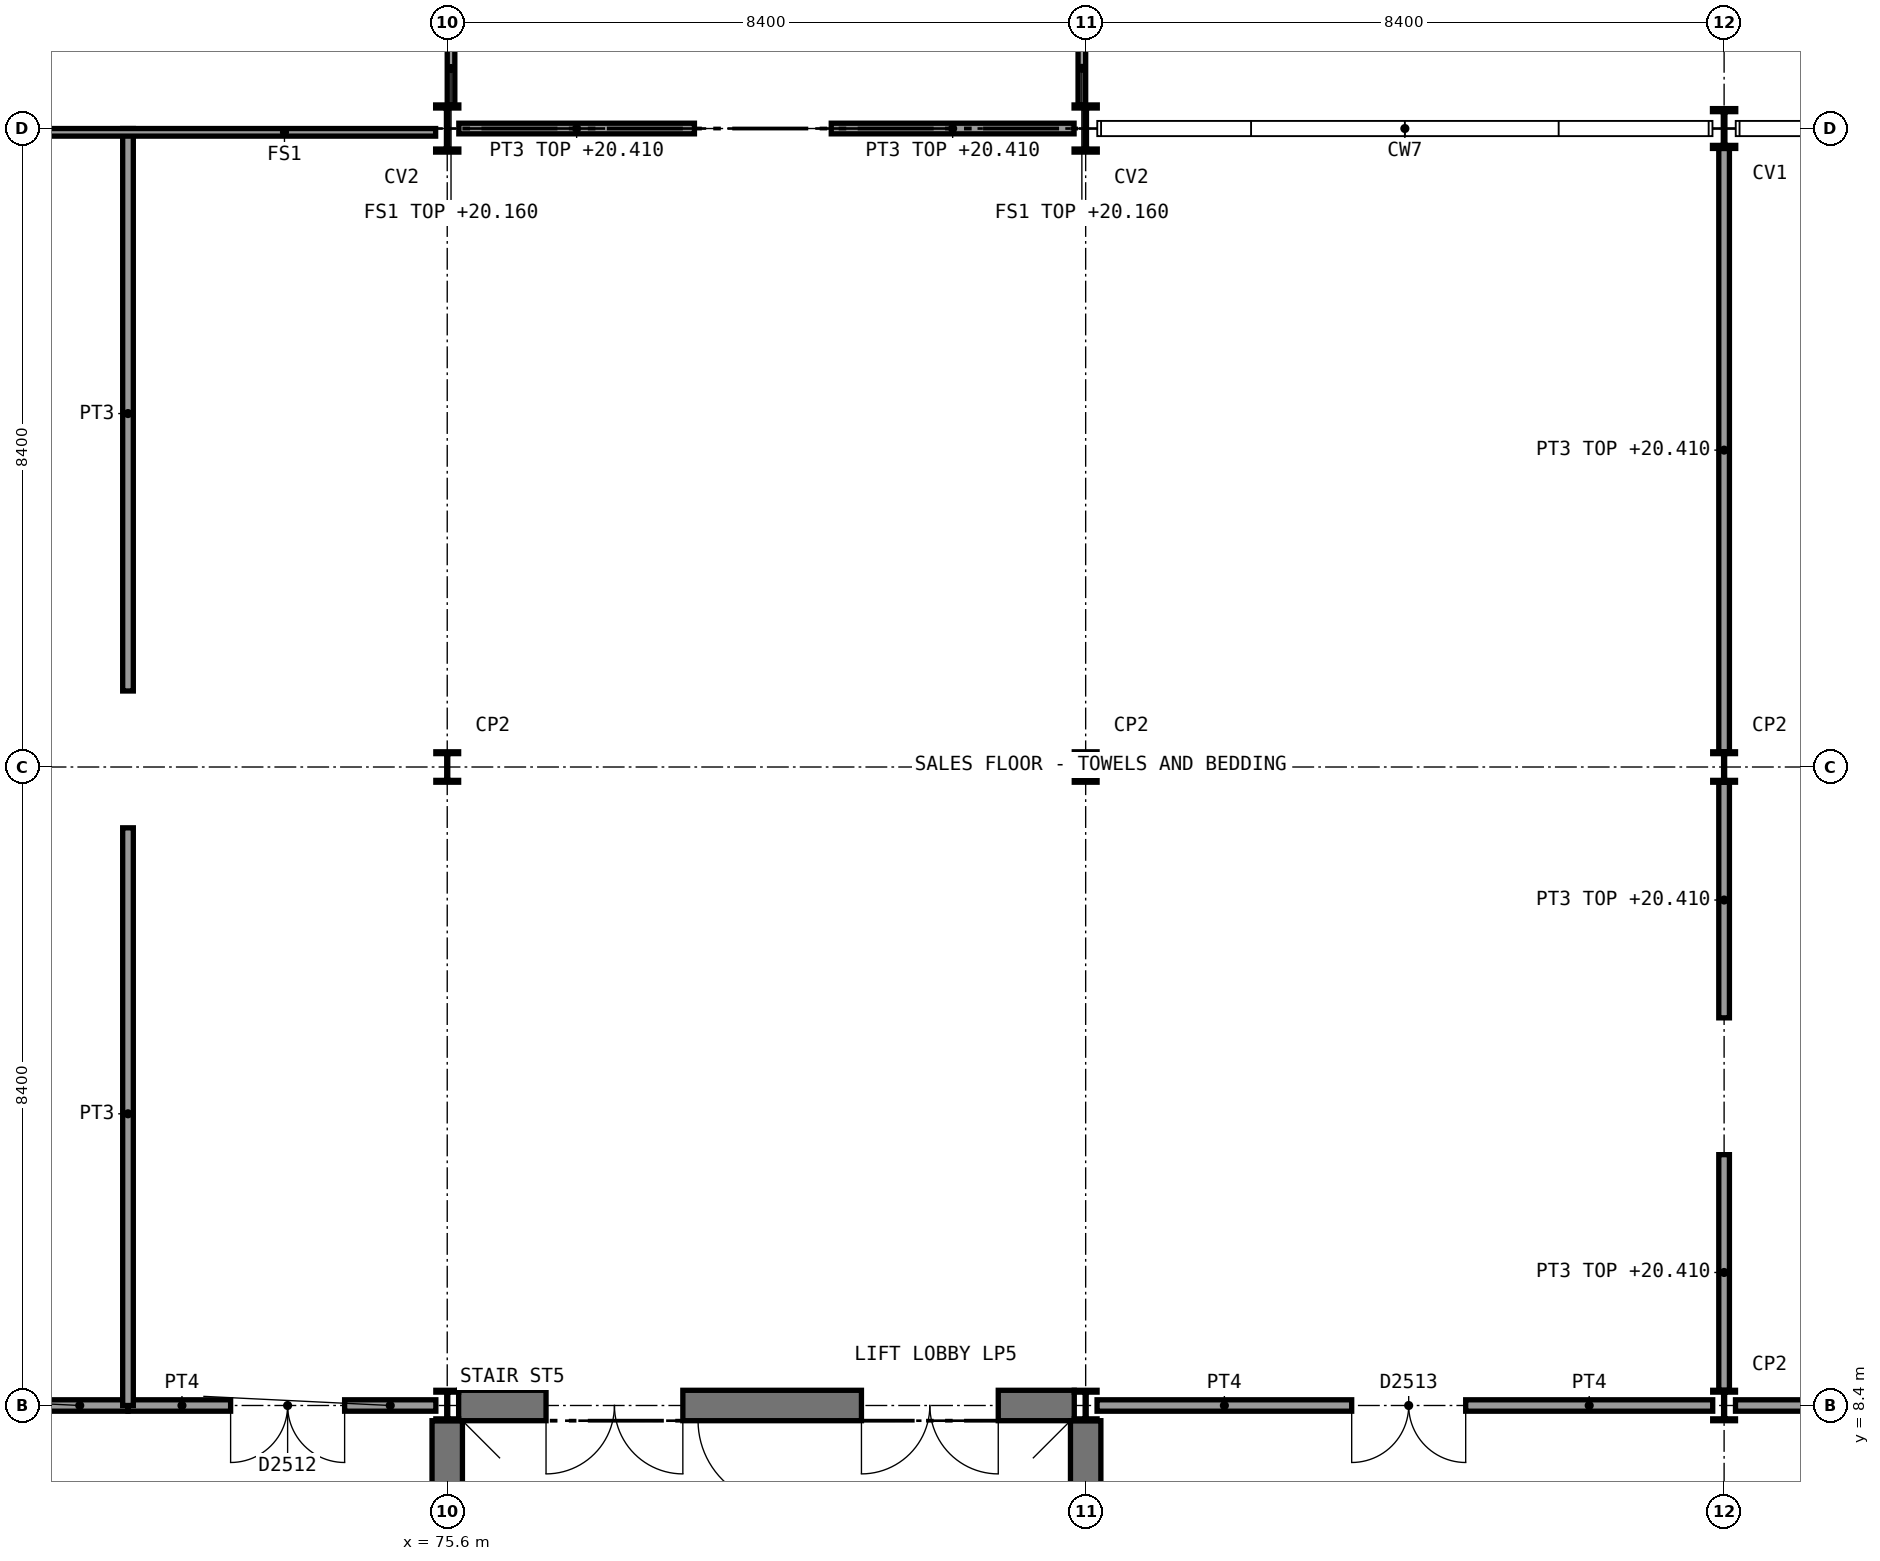
"""IFC4 building model, lengths in metres.
Left out: names, types, materials, properties, quantities, classifications, styles, units other than length and angle.
Written with IfcOpenShell. Run it as: python <this file> out.ifc"""

import sys

from ifc_helpers import new_model, si_unit, direction, frame, frame_2d, origin, origin_2d, place, context, subcontext, project, spatial, rectangle, i_section, extrude, element, fill, save


model = new_model("IFC4")
c1 = context("Model", 3, precision=1e-05, world=origin(), true_north=direction((0.0, 1.0)))
c2 = subcontext(c1, "Body", "Model", "MODEL_VIEW")
j1 = project(units=[si_unit("LENGTHUNIT", "METRE"), si_unit("PLANEANGLEUNIT", "RADIAN")], contexts=[c1])
p1 = place(None, origin())
s1 = spatial("IfcSite", under=j1, at=p1, CompositionType="ELEMENT")
p2 = place(p1, origin())
s2 = spatial("IfcBuilding", under=s1, at=p2, CompositionType="ELEMENT")
p3 = place(p2, frame((0.0, 0.0, 16.2)))
s3 = spatial("IfcBuildingStorey", under=s2, at=p3, CompositionType="ELEMENT", Elevation=16.2)
p4 = place(p3, frame((75.75, 8.4, 0.0), z_axis=(0.0, 0.0, 1.0), x_axis=(1.0, 0.0, 0.0)))
e1 = element("IfcWall", 1, at=p4, inside=s3, PredefinedType="SHEAR", context=c2, shape_type="SweptSolid", body=[
    extrude(rectangle(XDim=8.1, YDim=0.4, at=frame_2d((4.05, 0.0))), origin(), (0.0, 0.0, 1.0), 4.65),
])
p5 = place(p4, frame((1.15, 0.0, 0.0)))
e2 = element("IfcOpeningElement", 2, at=p5, cuts=e1, PredefinedType="OPENING", context=c2, shape_type="SweptSolid", body=[
    extrude(rectangle(XDim=1.8, YDim=2.1, at=frame_2d((0.9, 1.05))), frame((0.0, 0.21, 0.0), z_axis=(0.0, -1.0, 0.0), x_axis=(1.0, 0.0, 0.0)), (0.0, 0.0, 1.0), 0.42),
])
p6 = place(p4, frame((5.3, 0.0, 0.0)))
e3 = element("IfcOpeningElement", 3, at=p6, cuts=e1, PredefinedType="OPENING", context=c2, shape_type="SweptSolid", body=[
    extrude(rectangle(XDim=1.8, YDim=2.1, at=frame_2d((0.9, 1.05))), frame((0.0, 0.21, 0.0), z_axis=(0.0, -1.0, 0.0), x_axis=(1.0, 0.0, 0.0)), (0.0, 0.0, 1.0), 0.42),
])
for number, where, z_axis, x_axis in (
    (4, (75.6, 0.2, 0.0), (0.0, 0.0, 1.0), (0.0, 1.0, 0.0)),
    (5, (84.0, 0.2, 0.0), (0.0, 0.0, 1.0), (0.0, 1.0, 0.0)),
):
    element("IfcWall", number, at=place(p3, frame(where, z_axis=z_axis, x_axis=x_axis)), inside=s3, PredefinedType="SHEAR", context=c2, shape_type="SweptSolid", body=[
        extrude(rectangle(XDim=8.0, YDim=0.4, at=frame_2d((4.0, 0.0))), origin(), (0.0, 0.0, 1.0), 4.65),
    ])
for number, where, z_axis, x_axis in (
    (6, (75.6, 8.4, 0.0), (0.0, 0.0, 1.0), (1.0, 0.0, 0.0)),
    (7, (75.6, 16.8, 0.0), (0.0, 0.0, 1.0), (1.0, 0.0, 0.0)),
):
    element("IfcColumn", number, at=place(p3, frame(where, z_axis=z_axis, x_axis=x_axis)), inside=s3, PredefinedType="COLUMN", context=c2, shape_type="SweptSolid", body=[
        extrude(i_section(OverallWidth=0.3, OverallDepth=0.4, WebThickness=0.013, FlangeThickness=0.024, FilletRadius=0.027, at=origin_2d()), origin(), (0.0, 0.0, 1.0), 4.8),
    ])
p7 = place(p3, frame((75.6, 25.2, 0.0), z_axis=(0.0, 0.0, 1.0), x_axis=(1.0, 0.0, 0.0)))
e8 = element("IfcColumn", 8, at=p7, inside=s3, PredefinedType="COLUMN", context=c2, shape_type="SweptSolid", body=[
    extrude(i_section(OverallWidth=0.305, OverallDepth=0.62, WebThickness=0.021, FlangeThickness=0.04, FilletRadius=0.027, at=origin_2d()), origin(), (0.0, 0.0, 1.0), 4.8),
])
for number, where, z_axis, x_axis in (
    (9, (84.0, 8.4, 0.0), (0.0, 0.0, 1.0), (1.0, 0.0, 0.0)),
    (10, (84.0, 16.8, 0.0), (0.0, 0.0, 1.0), (1.0, 0.0, 0.0)),
):
    element("IfcColumn", number, at=place(p3, frame(where, z_axis=z_axis, x_axis=x_axis)), inside=s3, PredefinedType="COLUMN", context=c2, shape_type="SweptSolid", body=[
        extrude(i_section(OverallWidth=0.3, OverallDepth=0.4, WebThickness=0.013, FlangeThickness=0.024, FilletRadius=0.027, at=origin_2d()), origin(), (0.0, 0.0, 1.0), 4.8),
    ])
p8 = place(p3, frame((84.0, 25.2, 0.0), z_axis=(0.0, 0.0, 1.0), x_axis=(1.0, 0.0, 0.0)))
e11 = element("IfcColumn", 11, at=p8, inside=s3, PredefinedType="COLUMN", context=c2, shape_type="SweptSolid", body=[
    extrude(i_section(OverallWidth=0.305, OverallDepth=0.62, WebThickness=0.021, FlangeThickness=0.04, FilletRadius=0.027, at=origin_2d()), origin(), (0.0, 0.0, 1.0), 4.8),
])
for number, where, z_axis, x_axis in (
    (12, (92.4, 8.4, 0.0), (0.0, 0.0, 1.0), (1.0, 0.0, 0.0)),
    (13, (92.4, 16.8, 0.0), (0.0, 0.0, 1.0), (1.0, 0.0, 0.0)),
):
    element("IfcColumn", number, at=place(p3, frame(where, z_axis=z_axis, x_axis=x_axis)), inside=s3, PredefinedType="COLUMN", context=c2, shape_type="SweptSolid", body=[
        extrude(i_section(OverallWidth=0.3, OverallDepth=0.4, WebThickness=0.013, FlangeThickness=0.024, FilletRadius=0.027, at=origin_2d()), origin(), (0.0, 0.0, 1.0), 4.8),
    ])
p9 = place(p3, frame((92.4, 25.2, 0.0), z_axis=(0.0, 0.0, 1.0), x_axis=(1.0, 0.0, 0.0)))
e14 = element("IfcColumn", 14, at=p9, inside=s3, PredefinedType="COLUMN", context=c2, shape_type="SweptSolid", body=[
    extrude(i_section(OverallWidth=0.306, OverallDepth=0.524, WebThickness=0.021, FlangeThickness=0.04, FilletRadius=0.027, at=origin_2d()), origin(), (0.0, 0.0, 1.0), 4.8),
])
p10 = place(p3, frame((67.35, 8.4, 0.0), z_axis=(0.0, 0.0, 1.0), x_axis=(1.0, 0.0, 0.0)))
e15 = element("IfcWall", 15, at=p10, inside=s3, PredefinedType="SOLIDWALL", context=c2, shape_type="SweptSolid", body=[
    extrude(rectangle(XDim=4.05, YDim=0.15, at=frame_2d((2.025, 0.0))), origin(), (0.0, 0.0, 1.0), 4.32),
])
p11 = place(p10, frame((1.35, 0.0, 0.0)))
e16 = element("IfcOpeningElement", 16, at=p11, cuts=e15, PredefinedType="OPENING", context=c2, shape_type="SweptSolid", body=[
    extrude(rectangle(XDim=1.5, YDim=2.1, at=frame_2d((0.75, 1.05))), frame((0.0, 0.085, 0.0), z_axis=(0.0, -1.0, 0.0), x_axis=(1.0, 0.0, 0.0)), (0.0, 0.0, 1.0), 0.17),
])
p12 = place(p3, frame((71.4, 8.4, 0.0), z_axis=(0.0, 0.0, 1.0), x_axis=(1.0, 0.0, 0.0)))
e17 = element("IfcWall", 17, at=p12, inside=s3, PredefinedType="SOLIDWALL", context=c2, shape_type="SweptSolid", body=[
    extrude(rectangle(XDim=4.05, YDim=0.15, at=frame_2d((2.025, 0.0))), origin(), (0.0, 0.0, 1.0), 4.32),
])
p13 = place(p12, frame((1.35, 0.0, 0.0)))
e18 = element("IfcOpeningElement", 18, at=p13, cuts=e17, PredefinedType="OPENING", context=c2, shape_type="SweptSolid", body=[
    extrude(rectangle(XDim=1.5, YDim=2.1, at=frame_2d((0.75, 1.05))), frame((0.0, 0.085, 0.0), z_axis=(0.0, -1.0, 0.0), x_axis=(1.0, 0.0, 0.0)), (0.0, 0.0, 1.0), 0.17),
])
p14 = place(p3, frame((84.15, 8.4, 0.0), z_axis=(0.0, 0.0, 1.0), x_axis=(1.0, 0.0, 0.0)))
e19 = element("IfcWall", 19, at=p14, inside=s3, PredefinedType="SOLIDWALL", context=c2, shape_type="SweptSolid", body=[
    extrude(rectangle(XDim=8.1, YDim=0.15, at=frame_2d((4.05, 0.0))), origin(), (0.0, 0.0, 1.0), 4.32),
])
p15 = place(p14, frame((3.35, 0.0, 0.0)))
e20 = element("IfcOpeningElement", 20, at=p15, cuts=e19, PredefinedType="OPENING", context=c2, shape_type="SweptSolid", body=[
    extrude(rectangle(XDim=1.5, YDim=2.1, at=frame_2d((0.75, 1.05))), frame((0.0, 0.085, 0.0), z_axis=(0.0, -1.0, 0.0), x_axis=(1.0, 0.0, 0.0)), (0.0, 0.0, 1.0), 0.17),
])
p16 = place(p3, frame((92.55, 8.4, 0.0), z_axis=(0.0, 0.0, 1.0), x_axis=(1.0, 0.0, 0.0)))
e21 = element("IfcWall", 21, at=p16, inside=s3, PredefinedType="SOLIDWALL", context=c2, shape_type="SweptSolid", body=[
    extrude(rectangle(XDim=8.1, YDim=0.15, at=frame_2d((4.05, 0.0))), origin(), (0.0, 0.0, 1.0), 4.32),
])
p17 = place(p16, frame((3.35, 0.0, 0.0)))
e22 = element("IfcOpeningElement", 22, at=p17, cuts=e21, PredefinedType="OPENING", context=c2, shape_type="SweptSolid", body=[
    extrude(rectangle(XDim=1.5, YDim=2.1, at=frame_2d((0.75, 1.05))), frame((0.0, 0.085, 0.0), z_axis=(0.0, -1.0, 0.0), x_axis=(1.0, 0.0, 0.0)), (0.0, 0.0, 1.0), 0.17),
])
p18 = place(p3, frame((71.4, 8.4, 0.0), z_axis=(0.0, 0.0, 1.0), x_axis=(0.0, 1.0, 0.0)))
e23 = element("IfcWall", 23, at=p18, inside=s3, PredefinedType="PARTITIONING", context=c2, shape_type="SweptSolid", body=[
    extrude(rectangle(XDim=7.6, YDim=0.14, at=frame_2d((3.8, 0.0))), origin(), (0.0, 0.0, 1.0), 4.65),
])
p19 = place(p3, frame((71.4, 17.8, 0.0), z_axis=(0.0, 0.0, 1.0), x_axis=(0.0, 1.0, 0.0)))
e24 = element("IfcWall", 24, at=p19, inside=s3, PredefinedType="PARTITIONING", context=c2, shape_type="SweptSolid", body=[
    extrude(rectangle(XDim=7.4, YDim=0.14, at=frame_2d((3.7, 0.0))), origin(), (0.0, 0.0, 1.0), 4.65),
])
for number, where, z_axis, x_axis in (
    (25, (92.4, 8.6, 0.0), (0.0, 0.0, 1.0), (0.0, 1.0, 0.0)),
    (26, (92.4, 13.5, 0.0), (0.0, 0.0, 1.0), (0.0, 1.0, 0.0)),
):
    element("IfcWall", number, at=place(p3, frame(where, z_axis=z_axis, x_axis=x_axis)), inside=s3, PredefinedType="PARTITIONING", context=c2, shape_type="SweptSolid", body=[
        extrude(rectangle(XDim=3.1, YDim=0.14, at=frame_2d((1.55, 0.0))), origin(), (0.0, 0.0, 1.0), 4.21),
    ])
p20 = place(p3, frame((92.4, 17.0, 0.0), z_axis=(0.0, 0.0, 1.0), x_axis=(0.0, 1.0, 0.0)))
e27 = element("IfcWall", 27, at=p20, inside=s3, PredefinedType="PARTITIONING", context=c2, shape_type="SweptSolid", body=[
    extrude(rectangle(XDim=7.938, YDim=0.14, at=frame_2d((3.969, 0.0))), origin(), (0.0, 0.0, 1.0), 4.21),
])
p21 = place(p3, frame((75.753, 25.2, 0.0), z_axis=(0.0, 0.0, 1.0), x_axis=(1.0, 0.0, 0.0)))
e28 = element("IfcWall", 28, at=p21, inside=s3, PredefinedType="PARTITIONING", context=c2, shape_type="SweptSolid", body=[
    extrude(rectangle(XDim=3.1, YDim=0.14, at=frame_2d((1.55, 0.0))), origin(), (0.0, 0.0, 1.0), 4.21),
])
p22 = place(p3, frame((80.653, 25.2, 0.0), z_axis=(0.0, 0.0, 1.0), x_axis=(1.0, 0.0, 0.0)))
e29 = element("IfcWall", 29, at=p22, inside=s3, PredefinedType="PARTITIONING", context=c2, shape_type="SweptSolid", body=[
    extrude(rectangle(XDim=3.195, YDim=0.14, at=frame_2d((1.597, 0.0))), origin(), (0.0, 0.0, 1.0), 4.21),
])
p23 = place(p3, frame((80.0, 0.2, 0.0), z_axis=(0.0, 0.0, 1.0), x_axis=(0.0, 1.0, 0.0)))
e30 = element("IfcWall", 30, at=p23, inside=s3, PredefinedType="SHEAR", context=c2, shape_type="SweptSolid", body=[
    extrude(rectangle(XDim=8.0, YDim=0.2, at=frame_2d((4.0, 0.0))), origin(), (0.0, 0.0, 1.0), 4.65),
])
p24 = place(p23, frame((6.9, 0.0, 0.0)))
e31 = element("IfcOpeningElement", 31, at=p24, cuts=e30, PredefinedType="OPENING", context=c2, shape_type="SweptSolid", body=[
    extrude(rectangle(XDim=1.11, YDim=2.1, at=frame_2d((0.555, 1.05))), frame((0.0, 0.11, 0.0), z_axis=(0.0, -1.0, 0.0), x_axis=(1.0, 0.0, 0.0)), (0.0, 0.0, 1.0), 0.22),
])
p25 = place(p3, frame((67.353, 25.15, 0.0), z_axis=(0.0, 0.0, 1.0), x_axis=(1.0, 0.0, 0.0)))
e32 = element("IfcWall", 32, at=p25, inside=s3, PredefinedType="PARTITIONING", context=c2, shape_type="SweptSolid", body=[
    extrude(rectangle(XDim=8.094, YDim=0.1, at=frame_2d((4.047, 0.0))), origin(), (0.0, 0.0, 1.0), 4.11),
])
p26 = place(p3, frame((75.65, 25.51, 0.0), z_axis=(0.0, 0.0, 1.0), x_axis=(0.0, 1.0, 0.0)))
e33 = element("IfcWall", 33, at=p26, inside=s3, PredefinedType="PARTITIONING", context=c2, shape_type="SweptSolid", body=[
    extrude(rectangle(XDim=11.98, YDim=0.1, at=frame_2d((5.99, 0.0))), origin(), (0.0, 0.0, 1.0), 3.96),
])
p27 = place(p3, frame((83.95, 25.51, 0.0), z_axis=(0.0, 0.0, 1.0), x_axis=(0.0, 1.0, 0.0)))
e34 = element("IfcWall", 34, at=p27, inside=s3, PredefinedType="PARTITIONING", context=c2, shape_type="SweptSolid", body=[
    extrude(rectangle(XDim=12.051, YDim=0.1, at=frame_2d((6.025, 0.0))), origin(), (0.0, 0.0, 1.0), 3.96),
])
p28 = place(p13, frame((1.5, 0.0, 0.0), z_axis=(0.0, 0.0, 1.0), x_axis=(-1.0, 0.0, 0.0)))
e35 = element("IfcDoor", 35, at=p28, inside=s3, OperationType="DOUBLE_DOOR_SINGLE_SWING", PredefinedType="DOOR", context=c2, shape_type="SweptSolid", body=[
    extrude(rectangle(XDim=1.5, YDim=2.1, at=frame_2d((0.75, 1.05))), frame((0.0, 0.025, 0.0), z_axis=(0.0, -1.0, 0.0), x_axis=(1.0, 0.0, 0.0)), (0.0, 0.0, 1.0), 0.05),
])
fill(e18, e35)
p29 = place(p15, frame((1.5, 0.0, 0.0), z_axis=(0.0, 0.0, 1.0), x_axis=(-1.0, 0.0, 0.0)))
e36 = element("IfcDoor", 36, at=p29, inside=s3, OperationType="DOUBLE_DOOR_SINGLE_SWING", PredefinedType="DOOR", context=c2, shape_type="SweptSolid", body=[
    extrude(rectangle(XDim=1.5, YDim=2.1, at=frame_2d((0.75, 1.05))), frame((0.0, 0.025, 0.0), z_axis=(0.0, -1.0, 0.0), x_axis=(1.0, 0.0, 0.0)), (0.0, 0.0, 1.0), 0.05),
])
fill(e20, e36)
p30 = place(p24, origin())
e37 = element("IfcDoor", 37, at=p30, inside=s3, OperationType="SINGLE_SWING_RIGHT", PredefinedType="DOOR", context=c2, shape_type="SweptSolid", body=[
    extrude(rectangle(XDim=1.1, YDim=2.1, at=frame_2d((0.55, 1.05))), frame((0.0, 0.025, 0.0), z_axis=(0.0, -1.0, 0.0), x_axis=(1.0, 0.0, 0.0)), (0.0, 0.0, 1.0), 0.05),
])
fill(e31, e37)
p31 = place(p5, frame((1.8, 0.0, 0.0), z_axis=(0.0, 0.0, 1.0), x_axis=(-1.0, 0.0, 0.0)))
e38 = element("IfcDoor", 38, at=p31, inside=s3, OperationType="DOUBLE_DOOR_SINGLE_SWING", PredefinedType="DOOR", context=c2, shape_type="SweptSolid", body=[
    extrude(rectangle(XDim=1.8, YDim=2.1, at=frame_2d((0.9, 1.05))), frame((0.0, 0.025, 0.0), z_axis=(0.0, -1.0, 0.0), x_axis=(1.0, 0.0, 0.0)), (0.0, 0.0, 1.0), 0.05),
])
fill(e2, e38)
p32 = place(p6, frame((1.8, 0.0, 0.0), z_axis=(0.0, 0.0, 1.0), x_axis=(-1.0, 0.0, 0.0)))
e39 = element("IfcDoor", 39, at=p32, inside=s3, OperationType="DOUBLE_DOOR_SINGLE_SWING", PredefinedType="DOOR", context=c2, shape_type="SweptSolid", body=[
    extrude(rectangle(XDim=1.8, YDim=2.1, at=frame_2d((0.9, 1.05))), frame((0.0, 0.025, 0.0), z_axis=(0.0, -1.0, 0.0), x_axis=(1.0, 0.0, 0.0)), (0.0, 0.0, 1.0), 0.05),
])
fill(e3, e39)
save(model, sys.argv[1])
